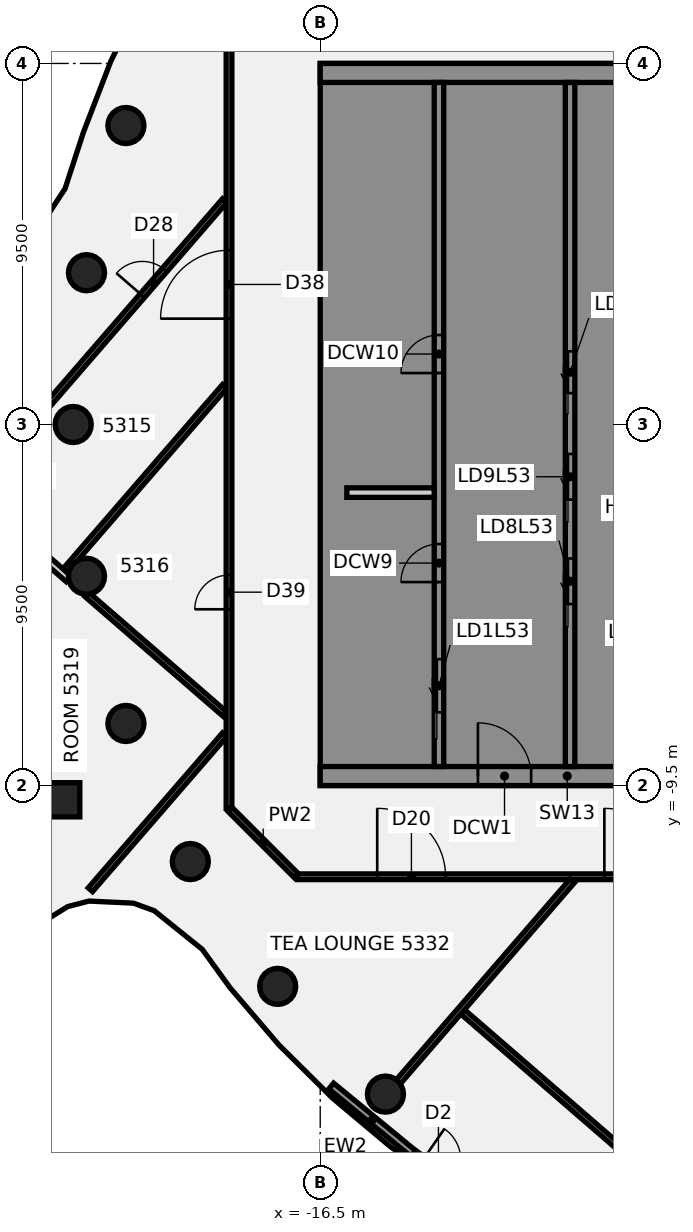
"""IFC4 building model, lengths in metres.
Left out: names, types, materials, properties, quantities, classifications, styles, units other than length and angle.
Written with IfcOpenShell. Run it as: python <this file> out.ifc"""

import sys

from ifc_helpers import new_model, si_unit, direction, frame, frame_2d, origin, origin_2d, place, context, subcontext, project, spatial, polyline, rectangle, circle, outline, extrude, element, fill, save


model = new_model("IFC4")
c1 = context("Model", 3, precision=1e-05, world=origin(), true_north=direction((0.0, 1.0)))
c2 = subcontext(c1, "Body", "Model", "MODEL_VIEW")
j1 = project(units=[si_unit("LENGTHUNIT", "METRE"), si_unit("PLANEANGLEUNIT", "RADIAN")], contexts=[c1])
p1 = place(None, origin())
s1 = spatial("IfcSite", under=j1, at=p1, CompositionType="ELEMENT")
p2 = place(p1, origin())
s2 = spatial("IfcBuilding", under=s1, at=p2, CompositionType="ELEMENT")
p3 = place(p2, frame((0.0, 0.0, 211.3)))
s3 = spatial("IfcBuildingStorey", under=s2, at=p3, CompositionType="ELEMENT", Elevation=211.3)
for number, where, z_axis, x_axis in (
    (1, (-21.613, 7.866, -0.14), (0.0, 0.0, 1.0), (1.0, 0.0, 0.0)),
    (2, (-22.651, 3.994, -0.14), (0.0, 0.0, 1.0), (1.0, 0.0, 0.0)),
    (3, (-23.0, 0.0, -0.14), (0.0, 0.0, 1.0), (1.0, 0.0, 0.0)),
    (4, (-22.651, -3.994, -0.14), (0.0, 0.0, 1.0), (1.0, 0.0, 0.0)),
    (5, (-21.613, -7.866, -0.14), (0.0, 0.0, 1.0), (1.0, 0.0, 0.0)),
    (6, (-19.919, -11.5, -0.14), (0.0, 0.0, 1.0), (1.0, 0.0, 0.0)),
    (7, (-17.619, -14.784, -0.14), (0.0, 0.0, 1.0), (1.0, 0.0, 0.0)),
    (8, (-14.784, -17.619, -0.14), (0.0, 0.0, 1.0), (1.0, 0.0, 0.0)),
):
    element("IfcColumn", number, at=place(p3, frame(where, z_axis=z_axis, x_axis=x_axis)), inside=s3, PredefinedType="COLUMN", context=c2, shape_type="SweptSolid", body=[
        extrude(circle(Radius=0.475, at=origin_2d()), origin(), (0.0, 0.0, 1.0), 3.56),
    ])
p4 = place(p3, frame((-23.276, -9.875, -0.139), z_axis=(0.050576720108, -0.006107636485, 0.998701503033), x_axis=(-0.754344619796, 0.65512033416, 0.042208320932)))
e9 = element("IfcColumn", 9, at=p4, inside=s3, PredefinedType="COLUMN", context=c2, shape_type="SweptSolid", body=[
    extrude(rectangle(XDim=0.9, YDim=0.9, at=origin_2d()), origin(), (0.0, 0.0, 1.0), 3.558),
])
p5 = place(p3, frame((-18.872, -10.128, 0.0), z_axis=(0.0, 0.0, 1.0), x_axis=(0.707106781187, -0.707106781187, 0.0)))
e10 = element("IfcWall", 10, at=p5, inside=s3, PredefinedType="PARTITIONING", context=c2, shape_type="SweptSolid", body=[
    extrude(rectangle(XDim=2.465, YDim=0.15, at=frame_2d((1.232, 0.0))), origin(), (0.0, 0.0, 1.0), 2.824),
])
p6 = place(p3, frame((-29.552, 1.513, 0.0), z_axis=(0.0, 0.0, 1.0), x_axis=(0.755865087151, -0.65472740131, 0.0)))
e11 = element("IfcWall", 11, at=p6, inside=s3, PredefinedType="PARTITIONING", context=c2, shape_type="SweptSolid", body=[
    extrude(rectangle(XDim=8.511, YDim=0.2, at=frame_2d((4.256, 0.0))), origin(), (0.0, 0.0, 1.0), 2.82),
])
p7 = place(p6, frame((5.799, 0.0, 0.0)))
e12 = element("IfcOpeningElement", 12, at=p7, cuts=e11, PredefinedType="OPENING", context=c2, shape_type="SweptSolid", body=[
    extrude(rectangle(XDim=1.4, YDim=2.1, at=frame_2d((0.7, 1.05))), frame((0.0, 0.11, 0.0), z_axis=(0.0, -1.0, 0.0), x_axis=(1.0, 0.0, 0.0)), (0.0, 0.0, 1.0), 0.22),
])
p8 = place(p3, frame((-22.638, -4.476, 0.0), z_axis=(0.0, 0.0, 1.0), x_axis=(0.755838297059, -0.654758328468, 0.0)))
e13 = element("IfcWall", 13, at=p8, inside=s3, PredefinedType="PARTITIONING", context=c2, shape_type="SweptSolid", body=[
    extrude(rectangle(XDim=4.804, YDim=0.15, at=frame_2d((2.402, 0.0))), origin(), (0.0, 0.0, 1.0), 2.824),
])
p9 = place(p3, frame((-12.749, -15.458, 0.0), z_axis=(0.0, 0.0, 1.0), x_axis=(0.755941384567, -0.654639307634, 0.0)))
e14 = element("IfcWall", 14, at=p9, inside=s3, PredefinedType="PARTITIONING", context=c2, shape_type="SweptSolid", body=[
    extrude(rectangle(XDim=10.949, YDim=0.15, at=frame_2d((5.474, 0.0))), origin(), (0.0, 0.0, 1.0), 2.824),
])
p10 = place(p9, frame((5.32, 0.0, 0.0)))
e15 = element("IfcOpeningElement", 15, at=p10, cuts=e14, PredefinedType="OPENING", context=c2, shape_type="SweptSolid", body=[
    extrude(rectangle(XDim=1.8, YDim=2.1, at=frame_2d((0.9, 1.05))), frame((0.0, 0.085, 0.0), z_axis=(0.0, -1.0, 0.0), x_axis=(1.0, 0.0, 0.0)), (0.0, 0.0, 1.0), 0.17),
])
p11 = place(p3, frame((-17.1, -11.9, 0.0), z_axis=(0.0, 0.0, 1.0), x_axis=(1.0, 0.0, 0.0)))
e16 = element("IfcWall", 16, at=p11, inside=s3, PredefinedType="PARTITIONING", context=c2, shape_type="SweptSolid", body=[
    extrude(rectangle(XDim=34.165, YDim=0.15, at=frame_2d((17.083, 0.0))), origin(), (0.0, 0.0, 1.0), 2.824),
])
p12 = place(p11, frame((8.077, 0.0, 0.0)))
e17 = element("IfcOpeningElement", 17, at=p12, cuts=e16, PredefinedType="OPENING", context=c2, shape_type="SweptSolid", body=[
    extrude(rectangle(XDim=1.8, YDim=2.1, at=frame_2d((0.9, 1.05))), frame((0.0, 0.085, 0.0), z_axis=(0.0, -1.0, 0.0), x_axis=(1.0, 0.0, 0.0)), (0.0, 0.0, 1.0), 0.17),
])
p13 = place(p11, frame((2.1, 0.0, 0.0)))
e18 = element("IfcOpeningElement", 18, at=p13, cuts=e16, PredefinedType="OPENING", context=c2, shape_type="SweptSolid", body=[
    extrude(rectangle(XDim=1.8, YDim=2.1, at=frame_2d((0.9, 1.05))), frame((0.0, 0.085, 0.0), z_axis=(0.0, -1.0, 0.0), x_axis=(1.0, 0.0, 0.0)), (0.0, 0.0, 1.0), 0.17),
])
p14 = place(p11, frame((25.154, 0.0, 0.0)))
e19 = element("IfcOpeningElement", 19, at=p14, cuts=e16, PredefinedType="OPENING", context=c2, shape_type="SweptSolid", body=[
    extrude(rectangle(XDim=1.8, YDim=2.1, at=frame_2d((0.9, 1.05))), frame((0.0, 0.085, 0.0), z_axis=(0.0, -1.0, 0.0), x_axis=(1.0, 0.0, 0.0)), (0.0, 0.0, 1.0), 0.17),
])
p15 = place(p3, frame((-25.632, -1.75, 0.0), z_axis=(0.0, 0.0, 1.0), x_axis=(0.65467576909, 0.755909807693, 0.0)))
e20 = element("IfcWall", 20, at=p15, inside=s3, PredefinedType="PARTITIONING", context=c2, shape_type="SweptSolid", body=[
    extrude(rectangle(XDim=10.107, YDim=0.15, at=frame_2d((5.054, 0.0))), origin(), (0.0, 0.0, 1.0), 2.824),
])
p16 = place(p15, frame((6.8, 0.0, 0.0)))
e21 = element("IfcOpeningElement", 21, at=p16, cuts=e20, PredefinedType="OPENING", context=c2, shape_type="SweptSolid", body=[
    extrude(rectangle(XDim=0.9, YDim=2.1, at=frame_2d((0.45, 1.05))), frame((0.0, 0.085, 0.0), z_axis=(0.0, -1.0, 0.0), x_axis=(1.0, 0.0, 0.0)), (0.0, 0.0, 1.0), 0.17),
])
p17 = place(p3, frame((-23.212, -3.844, 0.0), z_axis=(0.0, 0.0, 1.0), x_axis=(0.654652183263, 0.755930234181, 0.0)))
e22 = element("IfcWall", 22, at=p17, inside=s3, PredefinedType="PARTITIONING", context=c2, shape_type="SweptSolid", body=[
    extrude(rectangle(XDim=6.412, YDim=0.15, at=frame_2d((3.206, 0.0))), origin(), (0.0, 0.0, 1.0), 2.82),
])
p18 = place(p3, frame((-22.547, -12.241, 0.0), z_axis=(0.0, 0.0, 1.0), x_axis=(0.654687631303, 0.755899533945, 0.0)))
e23 = element("IfcWall", 23, at=p18, inside=s3, PredefinedType="PARTITIONING", context=c2, shape_type="SweptSolid", body=[
    extrude(rectangle(XDim=5.396, YDim=0.15, at=frame_2d((2.698, 0.0))), origin(), (0.0, 0.0, 1.0), 2.824),
])
p19 = place(p3, frame((-14.446, -17.295, 0.0), z_axis=(0.0, 0.0, 1.0), x_axis=(0.654627623615, 0.755951502678, 0.0)))
e24 = element("IfcWall", 24, at=p19, inside=s3, PredefinedType="PARTITIONING", context=c2, shape_type="SweptSolid", body=[
    extrude(rectangle(XDim=6.997, YDim=0.15, at=frame_2d((3.499, 0.0))), origin(), (0.0, 0.0, 1.0), 2.824),
])
p20 = place(p3, frame((-18.9, -10.1, 0.0), z_axis=(0.0, 0.0, 1.0), x_axis=(0.0, 1.0, 0.0)))
e25 = element("IfcWall", 25, at=p20, inside=s3, PredefinedType="PARTITIONING", context=c2, shape_type="SweptSolid", body=[
    extrude(rectangle(XDim=20.2, YDim=0.15, at=frame_2d((10.1, 0.0))), origin(), (0.0, 0.0, 1.0), 2.824),
])
p21 = place(p20, frame((12.885, 0.0, 0.0)))
e26 = element("IfcOpeningElement", 26, at=p21, cuts=e25, PredefinedType="OPENING", context=c2, shape_type="SweptSolid", body=[
    extrude(rectangle(XDim=1.8, YDim=2.1, at=frame_2d((0.9, 1.05))), frame((0.0, 0.085, 0.0), z_axis=(0.0, -1.0, 0.0), x_axis=(1.0, 0.0, 0.0)), (0.0, 0.0, 1.0), 0.17),
])
p22 = place(p20, frame((5.238, 0.0, 0.0)))
e27 = element("IfcOpeningElement", 27, at=p22, cuts=e25, PredefinedType="OPENING", context=c2, shape_type="SweptSolid", body=[
    extrude(rectangle(XDim=0.9, YDim=2.1, at=frame_2d((0.45, 1.05))), frame((0.0, 0.085, 0.0), z_axis=(0.0, -1.0, 0.0), x_axis=(1.0, 0.0, 0.0)), (0.0, 0.0, 1.0), 0.17),
])
p23 = place(p3, frame((-16.211, -17.408, 0.0), z_axis=(0.0, 0.0, 1.0), x_axis=(0.772584195676, -0.634912325122, 0.0)))
e28 = element("IfcWall", 28, at=p23, inside=s3, PredefinedType="SOLIDWALL", context=c2, shape_type="SweptSolid", body=[
    extrude(rectangle(XDim=2.8, YDim=0.2, at=frame_2d((1.4, 0.0))), origin(), (0.0, 0.0, 1.0), 3.42),
])
p24 = place(p3, frame((-14.047, -19.186, 0.0), z_axis=(0.0, 0.0, 1.0), x_axis=(0.823185720552, -0.567772198578, 0.0)))
e29 = element("IfcWall", 29, at=p24, inside=s3, PredefinedType="SOLIDWALL", context=c2, shape_type="SweptSolid", body=[
    extrude(rectangle(XDim=1.599, YDim=0.2, at=frame_2d((0.8, 0.0))), origin(), (0.0, 0.0, 1.0), 3.42),
])
p25 = place(p24, frame((0.3, 0.0, 0.0)))
e30 = element("IfcOpeningElement", 30, at=p25, cuts=e29, PredefinedType="OPENING", context=c2, shape_type="SweptSolid", body=[
    extrude(rectangle(XDim=1.0, YDim=2.4, at=frame_2d((0.5, 1.2))), frame((0.0, 0.11, 0.0), z_axis=(0.0, -1.0, 0.0), x_axis=(1.0, 0.0, 0.0)), (0.0, 0.0, 1.0), 0.22),
])
p26 = place(p3, frame((-16.5, -9.25, 0.0), z_axis=(0.0, 0.0, 1.0), x_axis=(1.0, 0.0, 0.0)))
e31 = element("IfcWall", 31, at=p26, inside=s3, PredefinedType="SHEAR", context=c2, shape_type="SweptSolid", body=[
    extrude(rectangle(XDim=13.0, YDim=0.5, at=frame_2d((6.5, 0.0))), origin(), (0.0, 0.0, 1.0), 3.42),
])
p27 = place(p26, frame((4.15, 0.0, 0.0)))
e32 = element("IfcOpeningElement", 32, at=p27, cuts=e31, PredefinedType="OPENING", context=c2, shape_type="SweptSolid", body=[
    extrude(rectangle(XDim=1.4, YDim=2.1, at=frame_2d((0.7, 1.05))), frame((0.0, 0.26, 0.0), z_axis=(0.0, -1.0, 0.0), x_axis=(1.0, 0.0, 0.0)), (0.0, 0.0, 1.0), 0.52),
])
p28 = place(p26, frame((10.125, 0.0, 0.0)))
e33 = element("IfcOpeningElement", 33, at=p28, cuts=e31, PredefinedType="OPENING", context=c2, shape_type="SweptSolid", body=[
    extrude(rectangle(XDim=1.4, YDim=2.1, at=frame_2d((0.7, 1.05))), frame((0.0, 0.26, 0.0), z_axis=(0.0, -1.0, 0.0), x_axis=(1.0, 0.0, 0.0)), (0.0, 0.0, 1.0), 0.52),
])
p29 = place(p3, origin())
e34 = element("IfcWall", 34, at=p29, inside=s3, PredefinedType="SHEAR", context=c2, shape_type="SweptSolid", body=[
    extrude(outline(polyline([(-13.5, -8.125), (-16.0, -8.125), (-16.0, -5.625), (-13.5, -5.625), (-13.5, -5.375), (-16.0, -5.375), (-16.0, 5.375), (-13.5, 5.375), (-13.5, 5.625), (-16.0, 5.625), (-16.0, 8.125), (-13.5, 8.125), (-13.5, 9.0), (-16.0, 9.0), (-16.5, 9.0), (-16.5, -9.0), (-16.0, -9.0), (-13.5, -9.0), (-13.5, -8.125)])), origin(), (0.0, 0.0, 1.0), 3.42),
])
p30 = place(p3, frame((-16.5, 9.25, 0.0), z_axis=(0.0, 0.0, 1.0), x_axis=(1.0, 0.0, 0.0)))
e35 = element("IfcWall", 35, at=p30, inside=s3, PredefinedType="SHEAR", context=c2, shape_type="SweptSolid", body=[
    extrude(rectangle(XDim=13.0, YDim=0.5, at=frame_2d((6.5, 0.0))), origin(), (0.0, 0.0, 1.0), 3.42),
])
p31 = place(p3, origin())
e36 = element("IfcWall", 36, at=p31, inside=s3, PredefinedType="SHEAR", context=c2, shape_type="SweptSolid", body=[
    extrude(outline(polyline([(-9.8, -5.375), (-9.8, -5.625), (-7.5, -5.625), (-7.25, -5.625), (-7.25, 9.0), (-7.5, 9.0), (-9.8, 9.0), (-9.8, 8.125), (-7.5, 8.125), (-7.5, 5.625), (-9.8, 5.625), (-9.8, 5.375), (-7.5, 5.375), (-7.5, 2.875), (-9.8, 2.875), (-9.8, 2.625), (-7.5, 2.625), (-7.5, 0.125), (-9.8, 0.125), (-9.8, -0.125), (-7.5, -0.125), (-7.5, -2.625), (-9.8, -2.625), (-9.8, -2.875), (-7.5, -2.875), (-7.5, -5.375), (-9.8, -5.375)])), origin(), (0.0, 0.0, 1.0), 3.42),
])
p32 = place(p3, origin())
e37 = element("IfcWall", 37, at=p32, inside=s3, PredefinedType="SHEAR", context=c2, shape_type="SweptSolid", body=[
    extrude(outline(polyline([(-7.5, -8.125), (-9.55, -8.125), (-9.55, -5.625), (-9.8, -5.625), (-9.8, -8.125), (-9.8, -9.0), (-7.5, -9.0), (-7.5, -8.125)])), origin(), (0.0, 0.0, 1.0), 3.42),
])
p33 = place(p3, frame((-13.375, -9.0, 0.0), z_axis=(0.0, 0.0, 1.0), x_axis=(0.0, 1.0, 0.0)))
e38 = element("IfcWall", 38, at=p33, inside=s3, PredefinedType="SHEAR", context=c2, shape_type="SweptSolid", body=[
    extrude(rectangle(XDim=18.0, YDim=0.25, at=frame_2d((9.0, 0.0))), origin(), (0.0, 0.0, 1.0), 3.42),
])
p34 = place(p33, frame((1.425, 0.0, 0.0)))
e39 = element("IfcOpeningElement", 39, at=p34, cuts=e38, PredefinedType="OPENING", context=c2, shape_type="SweptSolid", body=[
    extrude(rectangle(XDim=1.4, YDim=2.1, at=frame_2d((0.7, 1.05))), frame((0.0, 0.135, 0.0), z_axis=(0.0, -1.0, 0.0), x_axis=(1.0, 0.0, 0.0)), (0.0, 0.0, 1.0), 0.27),
])
p35 = place(p33, frame((4.854, 0.0, 0.0)))
e40 = element("IfcOpeningElement", 40, at=p35, cuts=e38, PredefinedType="OPENING", context=c2, shape_type="SweptSolid", body=[
    extrude(rectangle(XDim=1.0, YDim=2.1, at=frame_2d((0.5, 1.05))), frame((0.0, 0.135, 0.0), z_axis=(0.0, -1.0, 0.0), x_axis=(1.0, 0.0, 0.0)), (0.0, 0.0, 1.0), 0.27),
])
p36 = place(p33, frame((10.354, 0.0, 0.0)))
e41 = element("IfcOpeningElement", 41, at=p36, cuts=e38, PredefinedType="OPENING", context=c2, shape_type="SweptSolid", body=[
    extrude(rectangle(XDim=1.0, YDim=2.1, at=frame_2d((0.5, 1.05))), frame((0.0, 0.135, 0.0), z_axis=(0.0, -1.0, 0.0), x_axis=(1.0, 0.0, 0.0)), (0.0, 0.0, 1.0), 0.27),
])
p37 = place(p3, frame((-9.925, -9.0, 0.0), z_axis=(0.0, 0.0, 1.0), x_axis=(0.0, 1.0, 0.0)))
e42 = element("IfcWall", 42, at=p37, inside=s3, PredefinedType="SHEAR", context=c2, shape_type="SweptSolid", body=[
    extrude(rectangle(XDim=18.0, YDim=0.25, at=frame_2d((9.0, 0.0))), origin(), (0.0, 0.0, 1.0), 3.42),
])
p38 = place(p37, frame((4.275, 0.0, 0.0)))
e43 = element("IfcOpeningElement", 43, at=p38, cuts=e42, PredefinedType="OPENING", context=c2, shape_type="SweptSolid", body=[
    extrude(rectangle(XDim=1.2, YDim=2.1, at=frame_2d((0.6, 1.05))), frame((0.0, 0.135, 0.0), z_axis=(0.0, -1.0, 0.0), x_axis=(1.0, 0.0, 0.0)), (0.0, 0.0, 1.0), 0.27),
])
p39 = place(p37, frame((7.025, 0.0, 0.0)))
e44 = element("IfcOpeningElement", 44, at=p39, cuts=e42, PredefinedType="OPENING", context=c2, shape_type="SweptSolid", body=[
    extrude(rectangle(XDim=1.2, YDim=2.1, at=frame_2d((0.6, 1.05))), frame((0.0, 0.135, 0.0), z_axis=(0.0, -1.0, 0.0), x_axis=(1.0, 0.0, 0.0)), (0.0, 0.0, 1.0), 0.27),
])
p40 = place(p37, frame((9.825, 0.0, 0.0)))
e45 = element("IfcOpeningElement", 45, at=p40, cuts=e42, PredefinedType="OPENING", context=c2, shape_type="SweptSolid", body=[
    extrude(rectangle(XDim=1.1, YDim=2.1, at=frame_2d((0.55, 1.05))), frame((0.0, 0.135, 0.0), z_axis=(0.0, -1.0, 0.0), x_axis=(1.0, 0.0, 0.0)), (0.0, 0.0, 1.0), 0.27),
])
p41 = place(p3, frame((-15.8, -1.792, 0.0), z_axis=(0.0, 0.0, 1.0), x_axis=(1.0, 0.0, 0.0)))
e46 = element("IfcWall", 46, at=p41, inside=s3, PredefinedType="PARTITIONING", context=c2, shape_type="SweptSolid", body=[
    extrude(rectangle(XDim=2.3, YDim=0.25, at=frame_2d((1.15, 0.0))), origin(), (0.0, 0.0, 1.0), 3.42),
])
p42 = place(p12, origin())
e47 = element("IfcDoor", 47, at=p42, inside=s3, OperationType="DOUBLE_DOOR_SINGLE_SWING", PredefinedType="DOOR", context=c2, shape_type="SweptSolid", body=[
    extrude(rectangle(XDim=1.8, YDim=2.1, at=frame_2d((0.9, 1.05))), frame((0.0, 0.025, 0.0), z_axis=(0.0, -1.0, 0.0), x_axis=(1.0, 0.0, 0.0)), (0.0, 0.0, 1.0), 0.05),
])
fill(e17, e47)
p43 = place(p13, frame((1.8, 0.0, 0.0), z_axis=(0.0, 0.0, 1.0), x_axis=(-1.0, 0.0, 0.0)))
e48 = element("IfcDoor", 48, at=p43, inside=s3, OperationType="DOUBLE_DOOR_SINGLE_SWING", PredefinedType="DOOR", context=c2, shape_type="SweptSolid", body=[
    extrude(rectangle(XDim=1.8, YDim=2.1, at=frame_2d((0.9, 1.05))), frame((0.0, 0.025, 0.0), z_axis=(0.0, -1.0, 0.0), x_axis=(1.0, 0.0, 0.0)), (0.0, 0.0, 1.0), 0.05),
])
fill(e18, e48)
p44 = place(p16, origin())
e49 = element("IfcDoor", 49, at=p44, inside=s3, OperationType="SINGLE_SWING_LEFT", PredefinedType="DOOR", context=c2, shape_type="SweptSolid", body=[
    extrude(rectangle(XDim=0.9, YDim=2.1, at=frame_2d((0.45, 1.05))), frame((0.0, 0.025, 0.0), z_axis=(0.0, -1.0, 0.0), x_axis=(1.0, 0.0, 0.0)), (0.0, 0.0, 1.0), 0.05),
])
fill(e21, e49)
p45 = place(p21, frame((1.8, 0.0, 0.0), z_axis=(0.0, 0.0, 1.0), x_axis=(-1.0, 0.0, 0.0)))
e50 = element("IfcDoor", 50, at=p45, inside=s3, OperationType="DOUBLE_DOOR_SINGLE_SWING", PredefinedType="DOOR", context=c2, shape_type="SweptSolid", body=[
    extrude(rectangle(XDim=1.8, YDim=2.1, at=frame_2d((0.9, 1.05))), frame((0.0, 0.025, 0.0), z_axis=(0.0, -1.0, 0.0), x_axis=(1.0, 0.0, 0.0)), (0.0, 0.0, 1.0), 0.05),
])
fill(e26, e50)
p46 = place(p22, origin())
e51 = element("IfcDoor", 51, at=p46, inside=s3, OperationType="SINGLE_SWING_RIGHT", PredefinedType="DOOR", context=c2, shape_type="SweptSolid", body=[
    extrude(rectangle(XDim=0.9, YDim=2.1, at=frame_2d((0.45, 1.05))), frame((0.0, 0.025, 0.0), z_axis=(0.0, -1.0, 0.0), x_axis=(1.0, 0.0, 0.0)), (0.0, 0.0, 1.0), 0.05),
])
fill(e27, e51)
p47 = place(p27, origin())
e52 = element("IfcDoor", 52, at=p47, inside=s3, OperationType="SINGLE_SWING_LEFT", PredefinedType="DOOR", context=c2, shape_type="SweptSolid", body=[
    extrude(rectangle(XDim=1.4, YDim=2.1, at=frame_2d((0.7, 1.05))), frame((0.0, 0.025, 0.0), z_axis=(0.0, -1.0, 0.0), x_axis=(1.0, 0.0, 0.0)), (0.0, 0.0, 1.0), 0.05),
])
fill(e32, e52)
p48 = place(p34, origin())
e53 = element("IfcDoor", 53, at=p48, inside=s3, OperationType="SLIDING_TO_LEFT", PredefinedType="DOOR", context=c2, shape_type="SweptSolid", body=[
    extrude(rectangle(XDim=1.4, YDim=2.1, at=frame_2d((0.7, 1.05))), frame((0.0, 0.025, 0.0), z_axis=(0.0, -1.0, 0.0), x_axis=(1.0, 0.0, 0.0)), (0.0, 0.0, 1.0), 0.05),
])
fill(e39, e53)
p49 = place(p38, origin())
e54 = element("IfcDoor", 54, at=p49, inside=s3, OperationType="SLIDING_TO_LEFT", PredefinedType="DOOR", context=c2, shape_type="SweptSolid", body=[
    extrude(rectangle(XDim=1.2, YDim=2.1, at=frame_2d((0.6, 1.05))), frame((0.0, 0.025, 0.0), z_axis=(0.0, -1.0, 0.0), x_axis=(1.0, 0.0, 0.0)), (0.0, 0.0, 1.0), 0.05),
])
fill(e43, e54)
p50 = place(p39, origin())
e55 = element("IfcDoor", 55, at=p50, inside=s3, OperationType="SLIDING_TO_LEFT", PredefinedType="DOOR", context=c2, shape_type="SweptSolid", body=[
    extrude(rectangle(XDim=1.2, YDim=2.1, at=frame_2d((0.6, 1.05))), frame((0.0, 0.025, 0.0), z_axis=(0.0, -1.0, 0.0), x_axis=(1.0, 0.0, 0.0)), (0.0, 0.0, 1.0), 0.05),
])
fill(e44, e55)
p51 = place(p40, origin())
e56 = element("IfcDoor", 56, at=p51, inside=s3, OperationType="SLIDING_TO_LEFT", PredefinedType="DOOR", context=c2, shape_type="SweptSolid", body=[
    extrude(rectangle(XDim=1.1, YDim=2.1, at=frame_2d((0.55, 1.05))), frame((0.0, 0.025, 0.0), z_axis=(0.0, -1.0, 0.0), x_axis=(1.0, 0.0, 0.0)), (0.0, 0.0, 1.0), 0.05),
])
fill(e45, e56)
p52 = place(p35, origin())
e57 = element("IfcDoor", 57, at=p52, inside=s3, OperationType="SINGLE_SWING_LEFT", PredefinedType="DOOR", context=c2, shape_type="SweptSolid", body=[
    extrude(rectangle(XDim=1.0, YDim=2.1, at=frame_2d((0.5, 1.05))), frame((0.0, 0.025, 0.0), z_axis=(0.0, -1.0, 0.0), x_axis=(1.0, 0.0, 0.0)), (0.0, 0.0, 1.0), 0.05),
])
fill(e40, e57)
p53 = place(p36, origin())
e58 = element("IfcDoor", 58, at=p53, inside=s3, OperationType="SINGLE_SWING_LEFT", PredefinedType="DOOR", context=c2, shape_type="SweptSolid", body=[
    extrude(rectangle(XDim=1.0, YDim=2.1, at=frame_2d((0.5, 1.05))), frame((0.0, 0.025, 0.0), z_axis=(0.0, -1.0, 0.0), x_axis=(1.0, 0.0, 0.0)), (0.0, 0.0, 1.0), 0.05),
])
fill(e41, e58)
save(model, sys.argv[1])
